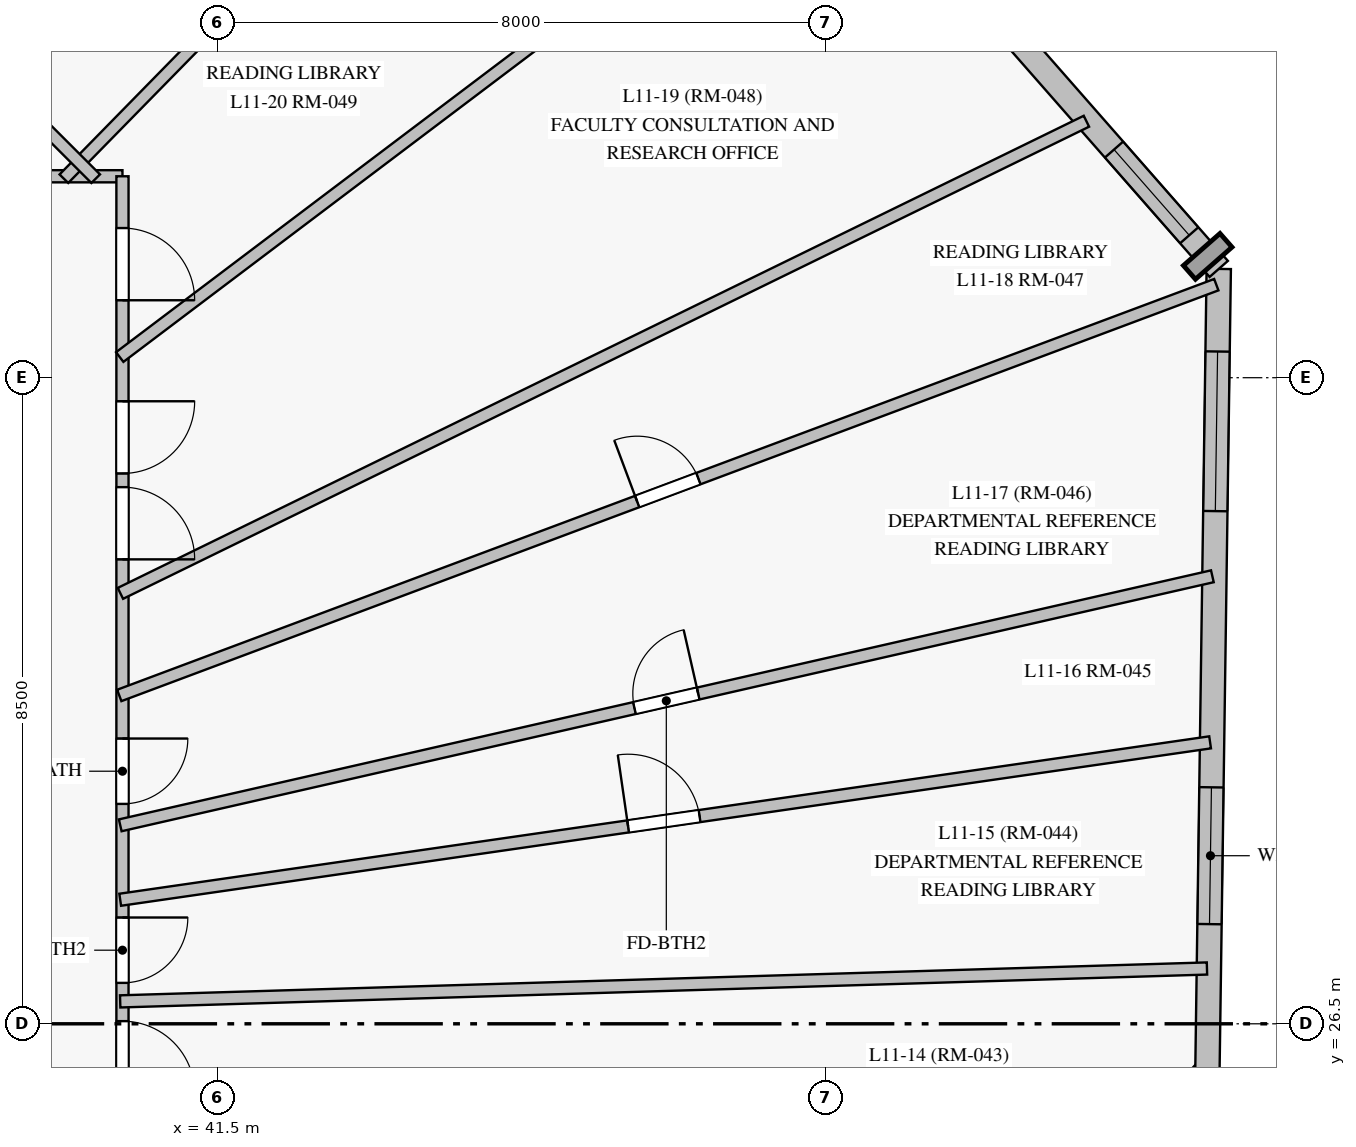
"""IFC4 building model, lengths in metres.
Left out: names, types, materials, properties, quantities, classifications, styles, units other than length and angle.
Written with IfcOpenShell. Run it as: python <this file> out.ifc"""

import sys

from ifc_helpers import new_model, si_unit, direction, frame, frame_2d, origin, origin_with_axes, place, context, subcontext, project, spatial, rectangle, extrude, source, transform, mapped, element, fill, save


model = new_model("IFC4")
c1 = context("Model", 3, precision=1e-05, world=origin(), true_north=direction((0.0, 1.0)))
c2 = subcontext(c1, "Body", "Model", "MODEL_VIEW")
j1 = project(units=[si_unit("LENGTHUNIT", "METRE"), si_unit("PLANEANGLEUNIT", "RADIAN")], contexts=[c1])
p1 = place(None, origin())
s1 = spatial("IfcSite", under=j1, at=p1, CompositionType="ELEMENT")
p2 = place(p1, origin())
s2 = spatial("IfcBuilding", under=s1, at=p2, CompositionType="ELEMENT")
p3 = place(p2, frame((0.0, 0.0, 44.5)))
s3 = spatial("IfcBuildingStorey", under=s2, at=p3, CompositionType="ELEMENT", Elevation=44.5)
p4 = place(p3, frame((43.69, 14.372, 0.0), z_axis=(0.0, 0.0, 1.0), x_axis=(0.684991460833, 0.728551095384, 0.0)))
e1 = element("IfcWall", 1, at=p4, inside=s3, PredefinedType="SOLIDWALL", context=c2, shape_type="SweptSolid", body=[
    extrude(rectangle(XDim=15.817, YDim=0.32, at=frame_2d((7.908, 0.0))), origin(), (0.0, 0.0, 1.0), 3.35),
])
p5 = place(p4, frame((2.928, 0.0, 0.85)))
e2 = element("IfcOpeningElement", 2, at=p5, cuts=e1, PredefinedType="OPENING", context=c2, shape_type="SweptSolid", body=[
    extrude(rectangle(XDim=2.1, YDim=1.95, at=frame_2d((1.05, 0.975))), frame((0.0, 0.17, 0.0), z_axis=(0.0, -1.0, 0.0), x_axis=(1.0, 0.0, 0.0)), (0.0, 0.0, 1.0), 0.34),
])
p6 = place(p4, frame((8.004, 0.0, 0.85)))
e3 = element("IfcOpeningElement", 3, at=p6, cuts=e1, PredefinedType="OPENING", context=c2, shape_type="SweptSolid", body=[
    extrude(rectangle(XDim=2.1, YDim=1.95, at=frame_2d((1.05, 0.975))), frame((0.0, 0.17, 0.0), z_axis=(0.0, -1.0, 0.0), x_axis=(1.0, 0.0, 0.0)), (0.0, 0.0, 1.0), 0.34),
])
p7 = place(p4, frame((12.784, 0.0, 0.85)))
e4 = element("IfcOpeningElement", 4, at=p7, cuts=e1, PredefinedType="OPENING", context=c2, shape_type="SweptSolid", body=[
    extrude(rectangle(XDim=2.1, YDim=1.95, at=frame_2d((1.05, 0.975))), frame((0.0, 0.17, 0.0), z_axis=(0.0, -1.0, 0.0), x_axis=(1.0, 0.0, 0.0)), (0.0, 0.0, 1.0), 0.34),
])
p8 = place(p3, frame((54.524, 25.895, 0.0), z_axis=(0.0, 0.0, 1.0), x_axis=(0.014133027678, 0.999900123777, 0.0)))
e5 = element("IfcWall", 5, at=p8, inside=s3, PredefinedType="SOLIDWALL", context=c2, shape_type="SweptSolid", body=[
    extrude(rectangle(XDim=10.537, YDim=0.32, at=frame_2d((5.269, 0.0))), origin(), (0.0, 0.0, 1.0), 3.35),
])
p9 = place(p8, frame((1.917, 0.0, 0.85)))
e6 = element("IfcOpeningElement", 6, at=p9, cuts=e5, PredefinedType="OPENING", context=c2, shape_type="SweptSolid", body=[
    extrude(rectangle(XDim=1.8, YDim=1.85, at=frame_2d((0.9, 0.925))), frame((0.0, 0.17, 0.0), z_axis=(0.0, -1.0, 0.0), x_axis=(1.0, 0.0, 0.0)), (0.0, 0.0, 1.0), 0.34),
])
p10 = place(p8, frame((7.351, 0.0, 0.85)))
e7 = element("IfcOpeningElement", 7, at=p10, cuts=e5, PredefinedType="OPENING", context=c2, shape_type="SweptSolid", body=[
    extrude(rectangle(XDim=2.1, YDim=1.95, at=frame_2d((1.05, 0.975))), frame((0.0, 0.17, 0.0), z_axis=(0.0, -1.0, 0.0), x_axis=(1.0, 0.0, 0.0)), (0.0, 0.0, 1.0), 0.34),
])
p11 = place(p3, frame((54.673, 36.431, 0.0), z_axis=(0.0, 0.0, 1.0), x_axis=(-0.659567357533, 0.751645462221, 0.0)))
e8 = element("IfcWall", 8, at=p11, inside=s3, PredefinedType="SOLIDWALL", context=c2, shape_type="SweptSolid", body=[
    extrude(rectangle(XDim=13.117, YDim=0.32, at=frame_2d((6.558, 0.0))), origin(), (0.0, 0.0, 1.0), 3.35),
])
p12 = place(p11, frame((0.589, 0.0, 0.85)))
e9 = element("IfcOpeningElement", 9, at=p12, cuts=e8, PredefinedType="OPENING", context=c2, shape_type="SweptSolid", body=[
    extrude(rectangle(XDim=1.5, YDim=1.85, at=frame_2d((0.75, 0.925))), frame((0.0, 0.17, 0.0), z_axis=(0.0, -1.0, 0.0), x_axis=(1.0, 0.0, 0.0)), (0.0, 0.0, 1.0), 0.34),
])
p13 = place(p11, frame((4.166, 0.0, 0.85)))
e10 = element("IfcOpeningElement", 10, at=p13, cuts=e8, PredefinedType="OPENING", context=c2, shape_type="SweptSolid", body=[
    extrude(rectangle(XDim=2.1, YDim=1.95, at=frame_2d((1.05, 0.975))), frame((0.0, 0.17, 0.0), z_axis=(0.0, -1.0, 0.0), x_axis=(1.0, 0.0, 0.0)), (0.0, 0.0, 1.0), 0.34),
])
p14 = place(p11, frame((8.712, 0.0, 0.85)))
e11 = element("IfcOpeningElement", 11, at=p14, cuts=e8, PredefinedType="OPENING", context=c2, shape_type="SweptSolid", body=[
    extrude(rectangle(XDim=2.1, YDim=1.95, at=frame_2d((1.05, 0.975))), frame((0.0, 0.17, 0.0), z_axis=(0.0, -1.0, 0.0), x_axis=(1.0, 0.0, 0.0)), (0.0, 0.0, 1.0), 0.34),
])
p15 = place(p3, frame((10.5, 37.65, 0.0), z_axis=(0.0, 0.0, 1.0), x_axis=(1.0, 0.0, 0.0)))
e12 = element("IfcWall", 12, at=p15, inside=s3, PredefinedType="PARTITIONING", context=c2, shape_type="SweptSolid", body=[
    extrude(rectangle(XDim=29.75, YDim=0.16, at=frame_2d((14.875, 0.0))), origin(), (0.0, 0.0, 1.0), 2.75),
])
p16 = place(p15, frame((21.927, 0.0, 0.0)))
e13 = element("IfcOpeningElement", 13, at=p16, cuts=e12, PredefinedType="OPENING", context=c2, shape_type="SweptSolid", body=[
    extrude(rectangle(XDim=0.95, YDim=2.15, at=frame_2d((0.475, 1.075))), frame((0.0, 0.09, 0.0), z_axis=(0.0, -1.0, 0.0), x_axis=(1.0, 0.0, 0.0)), (0.0, 0.0, 1.0), 0.18),
])
p17 = place(p15, frame((20.262, 0.0, 0.0)))
e14 = element("IfcOpeningElement", 14, at=p17, cuts=e12, PredefinedType="OPENING", context=c2, shape_type="SweptSolid", body=[
    extrude(rectangle(XDim=0.95, YDim=2.15, at=frame_2d((0.475, 1.075))), frame((0.0, 0.09, 0.0), z_axis=(0.0, -1.0, 0.0), x_axis=(1.0, 0.0, 0.0)), (0.0, 0.0, 1.0), 0.18),
])
p18 = place(p15, frame((18.722, 0.0, 0.0)))
e15 = element("IfcOpeningElement", 15, at=p18, cuts=e12, PredefinedType="OPENING", context=c2, shape_type="SweptSolid", body=[
    extrude(rectangle(XDim=0.95, YDim=2.15, at=frame_2d((0.475, 1.075))), frame((0.0, 0.09, 0.0), z_axis=(0.0, -1.0, 0.0), x_axis=(1.0, 0.0, 0.0)), (0.0, 0.0, 1.0), 0.18),
])
p19 = place(p15, frame((14.4, 0.0, 0.0)))
e16 = element("IfcOpeningElement", 16, at=p19, cuts=e12, PredefinedType="OPENING", context=c2, shape_type="SweptSolid", body=[
    extrude(rectangle(XDim=0.95, YDim=2.15, at=frame_2d((0.475, 1.075))), frame((0.0, 0.09, 0.0), z_axis=(0.0, -1.0, 0.0), x_axis=(1.0, 0.0, 0.0)), (0.0, 0.0, 1.0), 0.18),
])
p20 = place(p15, frame((6.962, 0.0, 0.0)))
e17 = element("IfcOpeningElement", 17, at=p20, cuts=e12, PredefinedType="OPENING", context=c2, shape_type="SweptSolid", body=[
    extrude(rectangle(XDim=0.95, YDim=2.15, at=frame_2d((0.475, 1.075))), frame((0.0, 0.09, 0.0), z_axis=(0.0, -1.0, 0.0), x_axis=(1.0, 0.0, 0.0)), (0.0, 0.0, 1.0), 0.18),
])
p21 = place(p3, frame((40.25, 37.65, 0.0), z_axis=(0.0, 0.0, 1.0), x_axis=(0.0, -1.0, 0.0)))
e18 = element("IfcWall", 18, at=p21, inside=s3, PredefinedType="PARTITIONING", context=c2, shape_type="SweptSolid", body=[
    extrude(rectangle(XDim=22.3, YDim=0.16, at=frame_2d((11.15, 0.0))), origin(), (0.0, 0.0, 1.0), 2.75),
])
p22 = place(p21, frame((14.02, 0.0, 0.0)))
e19 = element("IfcOpeningElement", 19, at=p22, cuts=e18, PredefinedType="OPENING", context=c2, shape_type="SweptSolid", body=[
    extrude(rectangle(XDim=0.95, YDim=2.15, at=frame_2d((0.475, 1.075))), frame((0.0, 0.09, 0.0), z_axis=(0.0, -1.0, 0.0), x_axis=(1.0, 0.0, 0.0)), (0.0, 0.0, 1.0), 0.18),
])
p23 = place(p21, frame((11.115, 0.0, 0.0)))
e20 = element("IfcOpeningElement", 20, at=p23, cuts=e18, PredefinedType="OPENING", context=c2, shape_type="SweptSolid", body=[
    extrude(rectangle(XDim=0.95, YDim=2.15, at=frame_2d((0.475, 1.075))), frame((0.0, 0.09, 0.0), z_axis=(0.0, -1.0, 0.0), x_axis=(1.0, 0.0, 0.0)), (0.0, 0.0, 1.0), 0.18),
])
p24 = place(p21, frame((7.397, 0.0, 0.0)))
e21 = element("IfcOpeningElement", 21, at=p24, cuts=e18, PredefinedType="OPENING", context=c2, shape_type="SweptSolid", body=[
    extrude(rectangle(XDim=0.86, YDim=2.1, at=frame_2d((0.43, 1.05))), frame((0.0, 0.09, 0.0), z_axis=(0.0, -1.0, 0.0), x_axis=(1.0, 0.0, 0.0)), (0.0, 0.0, 1.0), 0.18),
])
p25 = place(p21, frame((4.09, 0.0, 0.0)))
e22 = element("IfcOpeningElement", 22, at=p25, cuts=e18, PredefinedType="OPENING", context=c2, shape_type="SweptSolid", body=[
    extrude(rectangle(XDim=0.95, YDim=2.15, at=frame_2d((0.475, 1.075))), frame((0.0, 0.09, 0.0), z_axis=(0.0, -1.0, 0.0), x_axis=(1.0, 0.0, 0.0)), (0.0, 0.0, 1.0), 0.18),
])
p26 = place(p21, frame((2.96, 0.0, 0.0)))
e23 = element("IfcOpeningElement", 23, at=p26, cuts=e18, PredefinedType="OPENING", context=c2, shape_type="SweptSolid", body=[
    extrude(rectangle(XDim=0.95, YDim=2.15, at=frame_2d((0.475, 1.075))), frame((0.0, 0.09, 0.0), z_axis=(0.0, -1.0, 0.0), x_axis=(1.0, 0.0, 0.0)), (0.0, 0.0, 1.0), 0.18),
])
p27 = place(p21, frame((0.681, 0.0, 0.0)))
e24 = element("IfcOpeningElement", 24, at=p27, cuts=e18, PredefinedType="OPENING", context=c2, shape_type="SweptSolid", body=[
    extrude(rectangle(XDim=0.95, YDim=2.15, at=frame_2d((0.475, 1.075))), frame((0.0, 0.09, 0.0), z_axis=(0.0, -1.0, 0.0), x_axis=(1.0, 0.0, 0.0)), (0.0, 0.0, 1.0), 0.18),
])
p28 = place(p21, frame((15.145, 0.0, 0.0)))
e25 = element("IfcOpeningElement", 25, at=p28, cuts=e18, PredefinedType="OPENING", context=c2, shape_type="SweptSolid", body=[
    extrude(rectangle(XDim=0.95, YDim=2.15, at=frame_2d((0.475, 1.075))), frame((0.0, 0.09, 0.0), z_axis=(0.0, -1.0, 0.0), x_axis=(1.0, 0.0, 0.0)), (0.0, 0.0, 1.0), 0.18),
])
p29 = place(p21, frame((9.752, 0.0, 0.0)))
e26 = element("IfcOpeningElement", 26, at=p29, cuts=e18, PredefinedType="OPENING", context=c2, shape_type="SweptSolid", body=[
    extrude(rectangle(XDim=0.86, YDim=2.04, at=frame_2d((0.43, 1.02))), frame((0.0, 0.09, 0.0), z_axis=(0.0, -1.0, 0.0), x_axis=(1.0, 0.0, 0.0)), (0.0, 0.0, 1.0), 0.18),
])
p30 = place(p3, frame((40.208, 30.82, 0.0), z_axis=(0.0, 0.0, 1.0), x_axis=(0.936503538723, 0.350658126897, 0.0)))
e27 = element("IfcWall", 27, at=p30, inside=s3, PredefinedType="PARTITIONING", context=c2, shape_type="SweptSolid", body=[
    extrude(rectangle(XDim=15.411, YDim=0.16, at=frame_2d((7.706, 0.0))), origin(), (0.0, 0.0, 1.0), 3.35),
])
p31 = place(p30, frame((7.276, 0.0, 0.0)))
e28 = element("IfcOpeningElement", 28, at=p31, cuts=e27, PredefinedType="OPENING", context=c2, shape_type="SweptSolid", body=[
    extrude(rectangle(XDim=0.86, YDim=2.04, at=frame_2d((0.43, 1.02))), frame((0.0, 0.09, 0.0), z_axis=(0.0, -1.0, 0.0), x_axis=(1.0, 0.0, 0.0)), (0.0, 0.0, 1.0), 0.18),
])
p32 = place(p3, frame((40.221, 29.111, 0.0), z_axis=(0.0, 0.0, 1.0), x_axis=(0.974973940849, 0.22231917296, 0.0)))
e29 = element("IfcWall", 29, at=p32, inside=s3, PredefinedType="PARTITIONING", context=c2, shape_type="SweptSolid", body=[
    extrude(rectangle(XDim=14.737, YDim=0.16, at=frame_2d((7.369, 0.0))), origin(), (0.0, 0.0, 1.0), 3.35),
])
p33 = place(p32, frame((6.938, 0.0, 0.0)))
e30 = element("IfcOpeningElement", 30, at=p33, cuts=e29, PredefinedType="OPENING", context=c2, shape_type="SweptSolid", body=[
    extrude(rectangle(XDim=0.86, YDim=2.04, at=frame_2d((0.43, 1.02))), frame((0.0, 0.09, 0.0), z_axis=(0.0, -1.0, 0.0), x_axis=(1.0, 0.0, 0.0)), (0.0, 0.0, 1.0), 0.18),
])
p34 = place(p3, frame((40.22, 28.132, 0.0), z_axis=(0.0, 0.0, 1.0), x_axis=(0.989731959594, 0.142935818315, 0.0)))
e31 = element("IfcWall", 31, at=p34, inside=s3, PredefinedType="PARTITIONING", context=c2, shape_type="SweptSolid", body=[
    extrude(rectangle(XDim=14.488, YDim=0.16, at=frame_2d((7.244, 0.0))), origin(), (0.0, 0.0, 1.0), 3.35),
])
p35 = place(p34, frame((6.751, 0.0, 0.0)))
e32 = element("IfcOpeningElement", 32, at=p35, cuts=e31, PredefinedType="OPENING", context=c2, shape_type="SweptSolid", body=[
    extrude(rectangle(XDim=0.95, YDim=2.15, at=frame_2d((0.475, 1.075))), frame((0.0, 0.09, 0.0), z_axis=(0.0, -1.0, 0.0), x_axis=(1.0, 0.0, 0.0)), (0.0, 0.0, 1.0), 0.18),
])
p36 = place(p3, frame((40.22, 26.795, 0.0), z_axis=(0.0, 0.0, 1.0), x_axis=(0.999542039946, 0.030260706865, 0.0)))
e33 = element("IfcWall", 33, at=p36, inside=s3, PredefinedType="PARTITIONING", context=c2, shape_type="SweptSolid", body=[
    extrude(rectangle(XDim=14.304, YDim=0.16, at=frame_2d((7.152, 0.0))), origin(), (0.0, 0.0, 1.0), 3.35),
])
p37 = place(p3, frame((40.223, 32.163, 0.0), z_axis=(0.0, 0.0, 1.0), x_axis=(0.898436111138, 0.439104263477, 0.0)))
e34 = element("IfcWall", 34, at=p37, inside=s3, PredefinedType="PARTITIONING", context=c2, shape_type="SweptSolid", body=[
    extrude(rectangle(XDim=14.146, YDim=0.16, at=frame_2d((7.073, 0.0))), origin(), (0.0, 0.0, 1.0), 3.35),
])
p38 = place(p3, frame((39.479, 37.618, 0.0), z_axis=(0.0, 0.0, 1.0), x_axis=(0.699936539368, 0.714205041187, 0.0)))
e35 = element("IfcWall", 35, at=p38, inside=s3, PredefinedType="PARTITIONING", context=c2, shape_type="SweptSolid", body=[
    extrude(rectangle(XDim=10.643, YDim=0.16, at=frame_2d((5.321, 0.0))), origin(), (0.0, 0.0, 1.0), 3.35),
])
p39 = place(p38, frame((4.821, 0.0, 0.0)))
e36 = element("IfcOpeningElement", 36, at=p39, cuts=e35, PredefinedType="OPENING", context=c2, shape_type="SweptSolid", body=[
    extrude(rectangle(XDim=0.95, YDim=2.15, at=frame_2d((0.475, 1.075))), frame((0.0, 0.09, 0.0), z_axis=(0.0, -1.0, 0.0), x_axis=(1.0, 0.0, 0.0)), (0.0, 0.0, 1.0), 0.18),
])
p40 = place(p3, frame((40.214, 35.271, 0.0), z_axis=(0.0, 0.0, 1.0), x_axis=(0.797987752762, 0.602673664965, 0.0)))
e37 = element("IfcWall", 37, at=p40, inside=s3, PredefinedType="PARTITIONING", context=c2, shape_type="SweptSolid", body=[
    extrude(rectangle(XDim=8.536, YDim=0.16, at=frame_2d((4.268, 0.0))), origin(), (0.0, 0.0, 1.0), 3.35),
])
p41 = place(p3, frame((39.898, 37.618, 0.0), z_axis=(0.0, 0.0, 1.0), x_axis=(-0.707106781187, 0.707106781187, 0.0)))
e38 = element("IfcWall", 38, at=p41, inside=s3, PredefinedType="PARTITIONING", context=c2, shape_type="SweptSolid", body=[
    extrude(rectangle(XDim=2.647, YDim=0.16, at=frame_2d((1.324, 0.0))), origin(), (0.0, 0.0, 1.0), 2.75),
])
m1 = source(origin_with_axes(), c2, "Body", "SweptSolid", [
    extrude(rectangle(XDim=1.8, YDim=1.85, at=frame_2d((0.9, 0.925))), frame((0.0, 0.03, 0.0), z_axis=(0.0, -1.0, 0.0), x_axis=(1.0, 0.0, 0.0)), (0.0, 0.0, 1.0), 0.06),
])
p42 = place(p9, origin())
e39 = element("IfcWindow", 39, at=p42, inside=s3, PartitioningType="SINGLE_PANEL", PredefinedType="WINDOW", context=c2, shape_type="MappedRepresentation", body=[
    mapped(m1, transform((0.0, 0.0, 0.0), scale=1.0)),
])
fill(e6, e39)
m2 = source(origin_with_axes(), c2, "Body", "SweptSolid", [
    extrude(rectangle(XDim=2.1, YDim=1.95, at=frame_2d((1.05, 0.975))), frame((0.0, 0.03, 0.0), z_axis=(0.0, -1.0, 0.0), x_axis=(1.0, 0.0, 0.0)), (0.0, 0.0, 1.0), 0.06),
])
p43 = place(p10, origin())
e40 = element("IfcWindow", 40, at=p43, inside=s3, PartitioningType="SINGLE_PANEL", PredefinedType="WINDOW", context=c2, shape_type="MappedRepresentation", body=[
    mapped(m2, transform((0.0, 0.0, 0.0), scale=1.0)),
])
fill(e7, e40)
m3 = source(origin_with_axes(), c2, "Body", "SweptSolid", [
    extrude(rectangle(XDim=1.5, YDim=1.85, at=frame_2d((0.75, 0.925))), frame((0.0, 0.03, 0.0), z_axis=(0.0, -1.0, 0.0), x_axis=(1.0, 0.0, 0.0)), (0.0, 0.0, 1.0), 0.06),
])
p44 = place(p12, origin())
e41 = element("IfcWindow", 41, at=p44, inside=s3, PartitioningType="SINGLE_PANEL", PredefinedType="WINDOW", context=c2, shape_type="MappedRepresentation", body=[
    mapped(m3, transform((0.0, 0.0, 0.0), scale=1.0)),
])
fill(e9, e41)
m4 = source(origin_with_axes(), c2, "Body", "SweptSolid", [
    extrude(rectangle(XDim=0.95, YDim=2.15, at=frame_2d((0.475, 1.075))), frame((0.0, 0.025, 0.0), z_axis=(0.0, -1.0, 0.0), x_axis=(1.0, 0.0, 0.0)), (0.0, 0.0, 1.0), 0.05),
])
p45 = place(p23, origin())
e42 = element("IfcDoor", 42, at=p45, inside=s3, OperationType="SINGLE_SWING_RIGHT", PredefinedType="DOOR", context=c2, shape_type="MappedRepresentation", body=[
    mapped(m4, transform((0.0, 0.0, 0.0), scale=1.0)),
])
fill(e20, e42)
m5 = source(origin_with_axes(), c2, "Body", "SweptSolid", [
    extrude(rectangle(XDim=0.86, YDim=2.1, at=frame_2d((0.43, 1.05))), frame((0.0, 0.025, 0.0), z_axis=(0.0, -1.0, 0.0), x_axis=(1.0, 0.0, 0.0)), (0.0, 0.0, 1.0), 0.05),
])
p46 = place(p24, origin())
e43 = element("IfcDoor", 43, at=p46, inside=s3, OperationType="SINGLE_SWING_LEFT", PredefinedType="DOOR", context=c2, shape_type="MappedRepresentation", body=[
    mapped(m5, transform((0.0, 0.0, 0.0), scale=1.0)),
])
fill(e21, e43)
p47 = place(p25, origin())
e44 = element("IfcDoor", 44, at=p47, inside=s3, OperationType="SINGLE_SWING_RIGHT", PredefinedType="DOOR", context=c2, shape_type="MappedRepresentation", body=[
    mapped(m4, transform((0.0, 0.0, 0.0), scale=1.0)),
])
fill(e22, e44)
p48 = place(p26, origin())
e45 = element("IfcDoor", 45, at=p48, inside=s3, OperationType="SINGLE_SWING_LEFT", PredefinedType="DOOR", context=c2, shape_type="MappedRepresentation", body=[
    mapped(m4, transform((0.0, 0.0, 0.0), scale=1.0)),
])
fill(e23, e45)
p49 = place(p27, origin())
e46 = element("IfcDoor", 46, at=p49, inside=s3, OperationType="SINGLE_SWING_RIGHT", PredefinedType="DOOR", context=c2, shape_type="MappedRepresentation", body=[
    mapped(m4, transform((0.0, 0.0, 0.0), scale=1.0)),
])
fill(e24, e46)
p50 = place(p35, origin())
e47 = element("IfcDoor", 47, at=p50, inside=s3, OperationType="SINGLE_SWING_LEFT", PredefinedType="DOOR", context=c2, shape_type="MappedRepresentation", body=[
    mapped(m4, transform((0.0, 0.0, 0.0), scale=1.0)),
])
fill(e32, e47)
m6 = source(origin_with_axes(), c2, "Body", "SweptSolid", [
    extrude(rectangle(XDim=0.86, YDim=2.04, at=frame_2d((0.43, 1.02))), frame((0.0, 0.025, 0.0), z_axis=(0.0, -1.0, 0.0), x_axis=(1.0, 0.0, 0.0)), (0.0, 0.0, 1.0), 0.05),
])
p51 = place(p29, origin())
e48 = element("IfcDoor", 48, at=p51, inside=s3, OperationType="SINGLE_SWING_LEFT", PredefinedType="DOOR", context=c2, shape_type="MappedRepresentation", body=[
    mapped(m6, transform((0.0, 0.0, 0.0), scale=1.0)),
])
fill(e26, e48)
p52 = place(p33, origin())
e49 = element("IfcDoor", 49, at=p52, inside=s3, OperationType="SINGLE_SWING_RIGHT", PredefinedType="DOOR", context=c2, shape_type="MappedRepresentation", body=[
    mapped(m6, transform((0.0, 0.0, 0.0), scale=1.0)),
])
fill(e30, e49)
p53 = place(p31, origin())
e50 = element("IfcDoor", 50, at=p53, inside=s3, OperationType="SINGLE_SWING_LEFT", PredefinedType="DOOR", context=c2, shape_type="MappedRepresentation", body=[
    mapped(m6, transform((0.0, 0.0, 0.0), scale=1.0)),
])
fill(e28, e50)
save(model, sys.argv[1])
